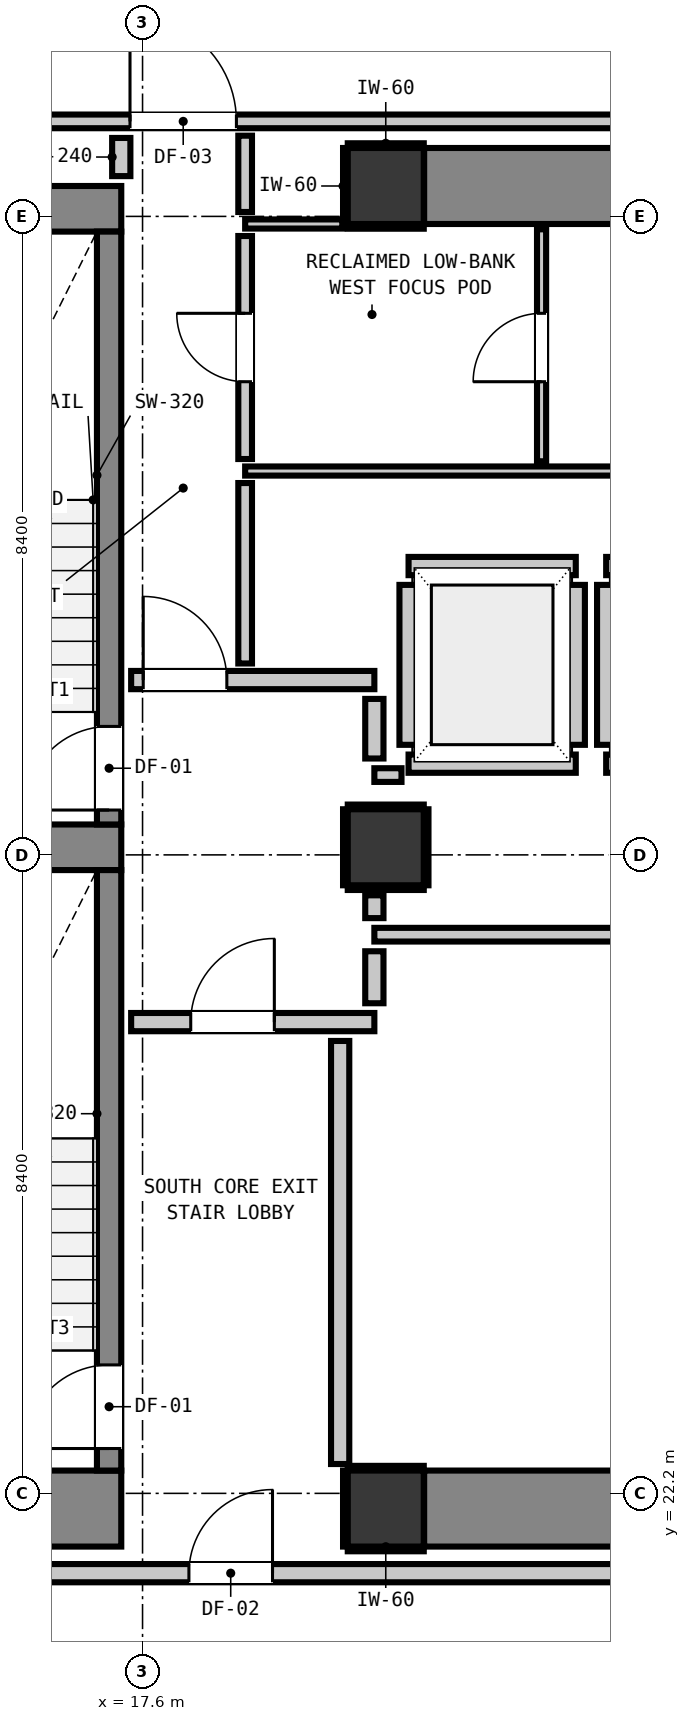
"""IFC4 building model, lengths in metres.
Left out: names, types, materials, properties, quantities, classifications, styles, units other than length and angle.
Written with IfcOpenShell. Run it as: python <this file> out.ifc"""

import sys

from ifc_helpers import new_model, si_unit, direction, frame, frame_2d, origin, origin_2d, place, context, subcontext, project, spatial, rectangle, extrude, element, fill, save


model = new_model("IFC4")
c1 = context("Model", 3, precision=1e-05, world=origin(), true_north=direction((0.0, 1.0)))
c2 = subcontext(c1, "Body", "Model", "MODEL_VIEW")
j1 = project(units=[si_unit("LENGTHUNIT", "METRE"), si_unit("PLANEANGLEUNIT", "RADIAN")], contexts=[c1])
p1 = place(None, origin())
s1 = spatial("IfcSite", under=j1, at=p1, CompositionType="ELEMENT")
p2 = place(p1, origin())
s2 = spatial("IfcBuilding", under=s1, at=p2, CompositionType="ELEMENT")
p3 = place(p2, frame((0.0, 0.0, 116.04)))
s3 = spatial("IfcBuildingStorey", under=s2, at=p3, CompositionType="ELEMENT", Elevation=116.04)
for number, where, z_axis, x_axis in (
    (1, (20.8, 22.0, 0.0), (0.0, 0.0, 1.0), (1.0, 0.0, 0.0)),
    (2, (20.8, 39.4, 0.0), (0.0, 0.0, 1.0), (1.0, 0.0, 0.0)),
):
    element("IfcColumn", number, at=place(p3, frame(where, z_axis=z_axis, x_axis=x_axis)), inside=s3, PredefinedType="COLUMN", context=c2, shape_type="SweptSolid", body=[
        extrude(rectangle(XDim=1.0, YDim=1.0, at=origin_2d()), origin(), (0.0, 0.0, 1.0), 3.32),
    ])
p4 = place(p3, frame((13.24, 22.0, 0.0), z_axis=(0.0, 0.0, 1.0), x_axis=(1.0, 0.0, 0.0)))
e3 = element("IfcWall", 3, at=p4, inside=s3, PredefinedType="SHEAR", context=c2, shape_type="SweptSolid", body=[
    extrude(rectangle(XDim=4.08, YDim=1.0, at=frame_2d((2.04, 0.0))), origin(), (0.0, 0.0, 1.0), 3.32),
])
p5 = place(p3, frame((13.24, 39.1, 0.0), z_axis=(0.0, 0.0, 1.0), x_axis=(1.0, 0.0, 0.0)))
e4 = element("IfcWall", 4, at=p5, inside=s3, PredefinedType="SHEAR", context=c2, shape_type="SweptSolid", body=[
    extrude(rectangle(XDim=4.08, YDim=0.6, at=frame_2d((2.04, 0.0))), origin(), (0.0, 0.0, 1.0), 3.32),
])
p6 = place(p3, frame((13.905, 30.7, 0.0), z_axis=(0.0, 0.0, 1.0), x_axis=(1.0, 0.0, 0.0)))
e5 = element("IfcWall", 5, at=p6, inside=s3, PredefinedType="SHEAR", context=c2, shape_type="SweptSolid", body=[
    extrude(rectangle(XDim=3.415, YDim=0.6, at=frame_2d((1.708, 0.0))), origin(), (0.0, 0.0, 1.0), 3.32),
])
for number, where, z_axis, x_axis in (
    (6, (21.305, 22.0, 0.0), (0.0, 0.0, 1.0), (1.0, 0.0, 0.0)),
    (7, (21.305, 39.4, 0.0), (0.0, 0.0, 1.0), (1.0, 0.0, 0.0)),
):
    element("IfcWall", number, at=place(p3, frame(where, z_axis=z_axis, x_axis=x_axis)), inside=s3, PredefinedType="SHEAR", context=c2, shape_type="SweptSolid", body=[
        extrude(rectangle(XDim=7.39, YDim=1.0, at=frame_2d((3.695, 0.0))), origin(), (0.0, 0.0, 1.0), 3.32),
    ])
p7 = place(p3, frame((17.16, 31.0, 0.0), z_axis=(0.0, 0.0, 1.0), x_axis=(0.0, 1.0, 0.0)))
e8 = element("IfcWall", 8, at=p7, inside=s3, PredefinedType="SHEAR", context=c2, shape_type="SweptSolid", body=[
    extrude(rectangle(XDim=7.8, YDim=0.32, at=frame_2d((3.9, 0.0))), origin(), (0.0, 0.0, 1.0), 3.32),
])
p8 = place(p7, frame((0.19, 0.0, 0.0)))
e9 = element("IfcOpeningElement", 9, at=p8, cuts=e8, PredefinedType="OPENING", context=c2, shape_type="SweptSolid", body=[
    extrude(rectangle(XDim=1.1, YDim=2.15, at=frame_2d((0.55, 1.075))), frame((0.0, 0.17, 0.0), z_axis=(0.0, -1.0, 0.0), x_axis=(1.0, 0.0, 0.0)), (0.0, 0.0, 1.0), 0.34),
])
p9 = place(p3, frame((17.16, 22.5, 0.0), z_axis=(0.0, 0.0, 1.0), x_axis=(0.0, 1.0, 0.0)))
e10 = element("IfcWall", 10, at=p9, inside=s3, PredefinedType="SHEAR", context=c2, shape_type="SweptSolid", body=[
    extrude(rectangle(XDim=7.9, YDim=0.32, at=frame_2d((3.95, 0.0))), origin(), (0.0, 0.0, 1.0), 3.32),
])
p10 = place(p9, frame((0.29, 0.0, 0.0)))
e11 = element("IfcOpeningElement", 11, at=p10, cuts=e10, PredefinedType="OPENING", context=c2, shape_type="SweptSolid", body=[
    extrude(rectangle(XDim=1.1, YDim=2.15, at=frame_2d((0.55, 1.075))), frame((0.0, 0.17, 0.0), z_axis=(0.0, -1.0, 0.0), x_axis=(1.0, 0.0, 0.0)), (0.0, 0.0, 1.0), 0.34),
])
p11 = place(p3, frame((20.8, 30.7, 0.0), z_axis=(0.0, 0.0, 1.0), x_axis=(1.0, 0.0, 0.0)))
e12 = element("IfcColumn", 12, at=p11, inside=s3, PredefinedType="COLUMN", context=c2, shape_type="SweptSolid", body=[
    extrude(rectangle(XDim=1.0, YDim=1.0, at=origin_2d()), origin(), (0.0, 0.0, 1.0), 3.32),
])
for number, where, z_axis, x_axis in (
    (13, (21.1, 31.8, 0.0), (0.0, 0.0, 1.0), (1.0, 0.0, 0.0)),
    (14, (21.1, 34.4, 0.0), (0.0, 0.0, 1.0), (1.0, 0.0, 0.0)),
):
    element("IfcWall", number, at=place(p3, frame(where, z_axis=z_axis, x_axis=x_axis)), inside=s3, PredefinedType="PARTITIONING", context=c2, shape_type="SweptSolid", body=[
        extrude(rectangle(XDim=2.2, YDim=0.24, at=frame_2d((1.1, 0.0))), origin(), (0.0, 0.0, 1.0), 3.08),
    ])
p12 = place(p3, frame((21.1, 32.048, 0.0), z_axis=(0.0, 0.0, 1.0), x_axis=(0.0, 1.0, 0.0)))
e15 = element("IfcWall", 15, at=p12, inside=s3, PredefinedType="PARTITIONING", context=c2, shape_type="SweptSolid", body=[
    extrude(rectangle(XDim=2.104, YDim=0.24, at=frame_2d((1.052, 0.0))), origin(), (0.0, 0.0, 1.0), 2.315),
])
p13 = place(p3, frame((23.3, 32.048, 0.0), z_axis=(0.0, 0.0, 1.0), x_axis=(0.0, 1.0, 0.0)))
e16 = element("IfcWall", 16, at=p13, inside=s3, PredefinedType="PARTITIONING", context=c2, shape_type="SweptSolid", body=[
    extrude(rectangle(XDim=2.104, YDim=0.24, at=frame_2d((1.052, 0.0))), origin(), (0.0, 0.0, 1.0), 3.08),
])
for number, where, z_axis, x_axis in (
    (17, (23.7, 31.8, 0.0), (0.0, 0.0, 1.0), (1.0, 0.0, 0.0)),
    (18, (23.7, 34.4, 0.0), (0.0, 0.0, 1.0), (1.0, 0.0, 0.0)),
):
    element("IfcWall", number, at=place(p3, frame(where, z_axis=z_axis, x_axis=x_axis)), inside=s3, PredefinedType="PARTITIONING", context=c2, shape_type="SweptSolid", body=[
        extrude(rectangle(XDim=2.2, YDim=0.24, at=frame_2d((1.1, 0.0))), origin(), (0.0, 0.0, 1.0), 3.08),
    ])
p14 = place(p3, frame((23.7, 32.048, 0.0), z_axis=(0.0, 0.0, 1.0), x_axis=(0.0, 1.0, 0.0)))
e19 = element("IfcWall", 19, at=p14, inside=s3, PredefinedType="PARTITIONING", context=c2, shape_type="SweptSolid", body=[
    extrude(rectangle(XDim=2.104, YDim=0.24, at=frame_2d((1.052, 0.0))), origin(), (0.0, 0.0, 1.0), 3.08),
])
p15 = place(p3, frame((3.207, 21.15, 0.0), z_axis=(0.0, 0.0, 1.0), x_axis=(1.0, 0.0, 0.0)))
e20 = element("IfcWall", 20, at=p15, inside=s3, PredefinedType="PARTITIONING", context=c2, shape_type="SweptSolid", body=[
    extrude(rectangle(XDim=39.386, YDim=0.24, at=frame_2d((19.693, 0.0))), origin(), (0.0, 0.0, 1.0), 3.08),
])
p16 = place(p15, frame((15.003, 0.0, 0.0)))
e21 = element("IfcOpeningElement", 21, at=p16, cuts=e20, PredefinedType="OPENING", context=c2, shape_type="SweptSolid", body=[
    extrude(rectangle(XDim=1.1, YDim=2.15, at=frame_2d((0.55, 1.075))), frame((0.0, 0.13, 0.0), z_axis=(0.0, -1.0, 0.0), x_axis=(1.0, 0.0, 0.0)), (0.0, 0.0, 1.0), 0.26),
])
p17 = place(p15, frame((7.243, 0.0, 0.0)))
e22 = element("IfcOpeningElement", 22, at=p17, cuts=e20, PredefinedType="OPENING", context=c2, shape_type="SweptSolid", body=[
    extrude(rectangle(XDim=1.4, YDim=2.15, at=frame_2d((0.7, 1.075))), frame((0.0, 0.13, 0.0), z_axis=(0.0, -1.0, 0.0), x_axis=(1.0, 0.0, 0.0)), (0.0, 0.0, 1.0), 0.26),
])
p18 = place(p15, frame((34.843, 0.0, 0.0)))
e23 = element("IfcOpeningElement", 23, at=p18, cuts=e20, PredefinedType="OPENING", context=c2, shape_type="SweptSolid", body=[
    extrude(rectangle(XDim=1.4, YDim=2.15, at=frame_2d((0.7, 1.075))), frame((0.0, 0.13, 0.0), z_axis=(0.0, -1.0, 0.0), x_axis=(1.0, 0.0, 0.0)), (0.0, 0.0, 1.0), 0.26),
])
p19 = place(p3, frame((17.45, 28.4, 0.0), z_axis=(0.0, 0.0, 1.0), x_axis=(1.0, 0.0, 0.0)))
e24 = element("IfcWall", 24, at=p19, inside=s3, PredefinedType="PARTITIONING", context=c2, shape_type="SweptSolid", body=[
    extrude(rectangle(XDim=3.2, YDim=0.24, at=frame_2d((1.6, 0.0))), origin(), (0.0, 0.0, 1.0), 3.08),
])
p20 = place(p19, frame((0.784, 0.0, 0.0)))
e25 = element("IfcOpeningElement", 25, at=p20, cuts=e24, PredefinedType="OPENING", context=c2, shape_type="SweptSolid", body=[
    extrude(rectangle(XDim=1.1, YDim=2.15, at=frame_2d((0.55, 1.075))), frame((0.0, 0.13, 0.0), z_axis=(0.0, -1.0, 0.0), x_axis=(1.0, 0.0, 0.0)), (0.0, 0.0, 1.0), 0.26),
])
p21 = place(p3, frame((17.45, 32.9, 0.0), z_axis=(0.0, 0.0, 1.0), x_axis=(1.0, 0.0, 0.0)))
e26 = element("IfcWall", 26, at=p21, inside=s3, PredefinedType="PARTITIONING", context=c2, shape_type="SweptSolid", body=[
    extrude(rectangle(XDim=3.2, YDim=0.24, at=frame_2d((1.6, 0.0))), origin(), (0.0, 0.0, 1.0), 3.08),
])
p22 = place(p21, frame((0.159, 0.0, 0.0)))
e27 = element("IfcOpeningElement", 27, at=p22, cuts=e26, PredefinedType="OPENING", context=c2, shape_type="SweptSolid", body=[
    extrude(rectangle(XDim=1.1, YDim=2.15, at=frame_2d((0.55, 1.075))), frame((0.0, 0.13, 0.0), z_axis=(0.0, -1.0, 0.0), x_axis=(1.0, 0.0, 0.0)), (0.0, 0.0, 1.0), 0.26),
])
p23 = place(p3, frame((20.65, 29.55, 0.0), z_axis=(0.0, 0.0, 1.0), x_axis=(1.0, 0.0, 0.0)))
e28 = element("IfcWall", 28, at=p23, inside=s3, PredefinedType="PARTITIONING", context=c2, shape_type="SweptSolid", body=[
    extrude(rectangle(XDim=9.325, YDim=0.18, at=frame_2d((4.663, 0.0))), origin(), (0.0, 0.0, 1.0), 3.08),
])
p24 = place(p3, frame((20.65, 31.65, 0.0), z_axis=(0.0, 0.0, 1.0), x_axis=(1.0, 0.0, 0.0)))
e29 = element("IfcWall", 29, at=p24, inside=s3, PredefinedType="PARTITIONING", context=c2, shape_type="SweptSolid", body=[
    extrude(rectangle(XDim=0.357, YDim=0.18, at=frame_2d((0.179, 0.0))), origin(), (0.0, 0.0, 1.0), 3.08),
])
p25 = place(p3, frame((12.979, 40.25, 0.0), z_axis=(0.0, 0.0, 1.0), x_axis=(1.0, 0.0, 0.0)))
e30 = element("IfcWall", 30, at=p25, inside=s3, PredefinedType="PARTITIONING", context=c2, shape_type="SweptSolid", body=[
    extrude(rectangle(XDim=29.614, YDim=0.18, at=frame_2d((14.807, 0.0))), origin(), (0.0, 0.0, 1.0), 3.08),
])
p26 = place(p25, frame((4.456, 0.0, 0.0)))
e31 = element("IfcOpeningElement", 31, at=p26, cuts=e30, PredefinedType="OPENING", context=c2, shape_type="SweptSolid", body=[
    extrude(rectangle(XDim=1.4, YDim=2.15, at=frame_2d((0.7, 1.075))), frame((0.0, 0.1, 0.0), z_axis=(0.0, -1.0, 0.0), x_axis=(1.0, 0.0, 0.0)), (0.0, 0.0, 1.0), 0.2),
])
p27 = place(p25, frame((25.071, 0.0, 0.0)))
e32 = element("IfcOpeningElement", 32, at=p27, cuts=e30, PredefinedType="OPENING", context=c2, shape_type="SweptSolid", body=[
    extrude(rectangle(XDim=1.4, YDim=2.15, at=frame_2d((0.7, 1.075))), frame((0.0, 0.1, 0.0), z_axis=(0.0, -1.0, 0.0), x_axis=(1.0, 0.0, 0.0)), (0.0, 0.0, 1.0), 0.2),
])
p28 = place(p3, frame((18.95, 35.65, 0.0), z_axis=(0.0, 0.0, 1.0), x_axis=(1.0, 0.0, 0.0)))
e33 = element("IfcWall", 33, at=p28, inside=s3, PredefinedType="PARTITIONING", context=c2, shape_type="SweptSolid", body=[
    extrude(rectangle(XDim=11.025, YDim=0.12, at=frame_2d((5.513, 0.0))), origin(), (0.0, 0.0, 1.0), 3.08),
])
p29 = place(p3, frame((18.95, 38.9, 0.0), z_axis=(0.0, 0.0, 1.0), x_axis=(1.0, 0.0, 0.0)))
e34 = element("IfcWall", 34, at=p29, inside=s3, PredefinedType="PARTITIONING", context=c2, shape_type="SweptSolid", body=[
    extrude(rectangle(XDim=1.278, YDim=0.12, at=frame_2d((0.639, 0.0))), origin(), (0.0, 0.0, 1.0), 3.08),
])
p30 = place(p3, frame((17.32, 39.53, 0.0), z_axis=(0.0, 0.0, 1.0), x_axis=(0.0, 1.0, 0.0)))
e35 = element("IfcWall", 35, at=p30, inside=s3, PredefinedType="PARTITIONING", context=c2, shape_type="SweptSolid", body=[
    extrude(rectangle(XDim=0.502, YDim=0.24, at=frame_2d((0.251, 0.0))), origin(), (0.0, 0.0, 1.0), 3.08),
])
p31 = place(p3, frame((20.2, 22.586, 0.0), z_axis=(0.0, 0.0, 1.0), x_axis=(0.0, 1.0, 0.0)))
e36 = element("IfcWall", 36, at=p31, inside=s3, PredefinedType="PARTITIONING", context=c2, shape_type="SweptSolid", body=[
    extrude(rectangle(XDim=5.566, YDim=0.24, at=frame_2d((2.783, 0.0))), origin(), (0.0, 0.0, 1.0), 3.08),
])
p32 = place(p3, frame((20.65, 28.648, 0.0), z_axis=(0.0, 0.0, 1.0), x_axis=(0.0, 1.0, 0.0)))
e37 = element("IfcWall", 37, at=p32, inside=s3, PredefinedType="PARTITIONING", context=c2, shape_type="SweptSolid", body=[
    extrude(rectangle(XDim=0.684, YDim=0.24, at=frame_2d((0.342, 0.0))), origin(), (0.0, 0.0, 1.0), 2.315),
])
p33 = place(p3, frame((20.65, 29.768, 0.0), z_axis=(0.0, 0.0, 1.0), x_axis=(0.0, 1.0, 0.0)))
e38 = element("IfcWall", 38, at=p33, inside=s3, PredefinedType="PARTITIONING", context=c2, shape_type="SweptSolid", body=[
    extrude(rectangle(XDim=0.3, YDim=0.24, at=frame_2d((0.15, 0.0))), origin(), (0.0, 0.0, 1.0), 2.315),
])
p34 = place(p3, frame((20.65, 31.868, 0.0), z_axis=(0.0, 0.0, 1.0), x_axis=(0.0, 1.0, 0.0)))
e39 = element("IfcWall", 39, at=p34, inside=s3, PredefinedType="PARTITIONING", context=c2, shape_type="SweptSolid", body=[
    extrude(rectangle(XDim=0.784, YDim=0.24, at=frame_2d((0.392, 0.0))), origin(), (0.0, 0.0, 1.0), 2.315),
])
p35 = place(p3, frame((18.95, 33.118, 0.0), z_axis=(0.0, 0.0, 1.0), x_axis=(0.0, 1.0, 0.0)))
e40 = element("IfcWall", 40, at=p35, inside=s3, PredefinedType="PARTITIONING", context=c2, shape_type="SweptSolid", body=[
    extrude(rectangle(XDim=2.374, YDim=0.18, at=frame_2d((1.187, 0.0))), origin(), (0.0, 0.0, 1.0), 3.08),
])
p36 = place(p3, frame((18.95, 35.808, 0.0), z_axis=(0.0, 0.0, 1.0), x_axis=(0.0, 1.0, 0.0)))
e41 = element("IfcWall", 41, at=p36, inside=s3, PredefinedType="PARTITIONING", context=c2, shape_type="SweptSolid", body=[
    extrude(rectangle(XDim=2.934, YDim=0.18, at=frame_2d((1.467, 0.0))), origin(), (0.0, 0.0, 1.0), 3.08),
])
p37 = place(p36, frame((1.017, 0.0, 0.0)))
e42 = element("IfcOpeningElement", 42, at=p37, cuts=e41, PredefinedType="OPENING", context=c2, shape_type="SweptSolid", body=[
    extrude(rectangle(XDim=0.9, YDim=2.1, at=frame_2d((0.45, 1.05))), frame((0.0, 0.1, 0.0), z_axis=(0.0, -1.0, 0.0), x_axis=(1.0, 0.0, 0.0)), (0.0, 0.0, 1.0), 0.2),
])
p38 = place(p3, frame((18.95, 39.058, 0.0), z_axis=(0.0, 0.0, 1.0), x_axis=(0.0, 1.0, 0.0)))
e43 = element("IfcWall", 43, at=p38, inside=s3, PredefinedType="PARTITIONING", context=c2, shape_type="SweptSolid", body=[
    extrude(rectangle(XDim=1.004, YDim=0.18, at=frame_2d((0.502, 0.0))), origin(), (0.0, 0.0, 1.0), 3.08),
])
p39 = place(p3, frame((22.85, 35.778, 0.0), z_axis=(0.0, 0.0, 1.0), x_axis=(0.0, 1.0, 0.0)))
e44 = element("IfcWall", 44, at=p39, inside=s3, PredefinedType="PARTITIONING", context=c2, shape_type="SweptSolid", body=[
    extrude(rectangle(XDim=3.052, YDim=0.12, at=frame_2d((1.526, 0.0))), origin(), (0.0, 0.0, 1.0), 3.08),
])
p40 = place(p39, frame((1.047, 0.0, 0.0)))
e45 = element("IfcOpeningElement", 45, at=p40, cuts=e44, PredefinedType="OPENING", context=c2, shape_type="SweptSolid", body=[
    extrude(rectangle(XDim=0.9, YDim=2.1, at=frame_2d((0.45, 1.05))), frame((0.0, 0.07, 0.0), z_axis=(0.0, -1.0, 0.0), x_axis=(1.0, 0.0, 0.0)), (0.0, 0.0, 1.0), 0.14),
])
for number, where, z_axis, x_axis in (
    (46, (20.3, 21.468, 0.0), (0.0, 0.0, 1.0), (1.0, 0.0, 0.0)),
    (47, (20.3, 22.532, 0.0), (0.0, 0.0, 1.0), (1.0, 0.0, 0.0)),
    (48, (20.268, 21.5, 0.0), (0.0, 0.0, 1.0), (0.0, 1.0, 0.0)),
    (49, (20.3, 38.868, 0.0), (0.0, 0.0, 1.0), (1.0, 0.0, 0.0)),
    (50, (20.3, 39.932, 0.0), (0.0, 0.0, 1.0), (1.0, 0.0, 0.0)),
    (51, (20.268, 38.9, 0.0), (0.0, 0.0, 1.0), (0.0, 1.0, 0.0)),
    (52, (20.3, 30.168, 0.0), (0.0, 0.0, 1.0), (1.0, 0.0, 0.0)),
    (53, (20.3, 31.232, 0.0), (0.0, 0.0, 1.0), (1.0, 0.0, 0.0)),
    (54, (20.268, 30.2, 0.0), (0.0, 0.0, 1.0), (0.0, 1.0, 0.0)),
    (55, (21.332, 30.2, 0.0), (0.0, 0.0, 1.0), (0.0, 1.0, 0.0)),
):
    element("IfcWall", number, at=place(p3, frame(where, z_axis=z_axis, x_axis=x_axis)), inside=s3, PredefinedType="PARTITIONING", context=c2, shape_type="SweptSolid", body=[
        extrude(rectangle(XDim=1.0, YDim=0.06, at=frame_2d((0.5, 0.0))), origin(), (0.0, 0.0, 1.0), 1.45),
    ])
p41 = place(p8, origin())
e56 = element("IfcDoor", 56, at=p41, inside=s3, OperationType="SINGLE_SWING_LEFT", PredefinedType="DOOR", context=c2, shape_type="SweptSolid", body=[
    extrude(rectangle(XDim=1.1, YDim=2.15, at=frame_2d((0.55, 1.075))), frame((0.0, 0.025, 0.0), z_axis=(0.0, -1.0, 0.0), x_axis=(1.0, 0.0, 0.0)), (0.0, 0.0, 1.0), 0.05),
])
fill(e9, e56)
p42 = place(p10, origin())
e57 = element("IfcDoor", 57, at=p42, inside=s3, OperationType="SINGLE_SWING_LEFT", PredefinedType="DOOR", context=c2, shape_type="SweptSolid", body=[
    extrude(rectangle(XDim=1.1, YDim=2.15, at=frame_2d((0.55, 1.075))), frame((0.0, 0.025, 0.0), z_axis=(0.0, -1.0, 0.0), x_axis=(1.0, 0.0, 0.0)), (0.0, 0.0, 1.0), 0.05),
])
fill(e11, e57)
p43 = place(p20, origin())
e58 = element("IfcDoor", 58, at=p43, inside=s3, OperationType="SINGLE_SWING_RIGHT", PredefinedType="DOOR", context=c2, shape_type="SweptSolid", body=[
    extrude(rectangle(XDim=1.1, YDim=2.15, at=frame_2d((0.55, 1.075))), frame((0.0, 0.025, 0.0), z_axis=(0.0, -1.0, 0.0), x_axis=(1.0, 0.0, 0.0)), (0.0, 0.0, 1.0), 0.05),
])
fill(e25, e58)
p44 = place(p22, origin())
e59 = element("IfcDoor", 59, at=p44, inside=s3, OperationType="SINGLE_SWING_LEFT", PredefinedType="DOOR", context=c2, shape_type="SweptSolid", body=[
    extrude(rectangle(XDim=1.1, YDim=2.15, at=frame_2d((0.55, 1.075))), frame((0.0, 0.025, 0.0), z_axis=(0.0, -1.0, 0.0), x_axis=(1.0, 0.0, 0.0)), (0.0, 0.0, 1.0), 0.05),
])
fill(e27, e59)
p45 = place(p16, origin())
e60 = element("IfcDoor", 60, at=p45, inside=s3, OperationType="SINGLE_SWING_RIGHT", PredefinedType="DOOR", context=c2, shape_type="SweptSolid", body=[
    extrude(rectangle(XDim=1.1, YDim=2.15, at=frame_2d((0.55, 1.075))), frame((0.0, 0.025, 0.0), z_axis=(0.0, -1.0, 0.0), x_axis=(1.0, 0.0, 0.0)), (0.0, 0.0, 1.0), 0.05),
])
fill(e21, e60)
p46 = place(p26, origin())
e61 = element("IfcDoor", 61, at=p46, inside=s3, OperationType="SINGLE_SWING_LEFT", PredefinedType="DOOR", context=c2, shape_type="SweptSolid", body=[
    extrude(rectangle(XDim=1.4, YDim=2.15, at=frame_2d((0.7, 1.075))), frame((0.0, 0.025, 0.0), z_axis=(0.0, -1.0, 0.0), x_axis=(1.0, 0.0, 0.0)), (0.0, 0.0, 1.0), 0.05),
])
fill(e31, e61)
p47 = place(p37, origin())
e62 = element("IfcDoor", 62, at=p47, inside=s3, OperationType="SINGLE_SWING_RIGHT", PredefinedType="DOOR", context=c2, shape_type="SweptSolid", body=[
    extrude(rectangle(XDim=0.9, YDim=2.1, at=frame_2d((0.45, 1.05))), frame((0.0, 0.025, 0.0), z_axis=(0.0, -1.0, 0.0), x_axis=(1.0, 0.0, 0.0)), (0.0, 0.0, 1.0), 0.05),
])
fill(e42, e62)
p48 = place(p40, origin())
e63 = element("IfcDoor", 63, at=p48, inside=s3, OperationType="SINGLE_SWING_LEFT", PredefinedType="DOOR", context=c2, shape_type="SweptSolid", body=[
    extrude(rectangle(XDim=0.9, YDim=2.1, at=frame_2d((0.45, 1.05))), frame((0.0, 0.025, 0.0), z_axis=(0.0, -1.0, 0.0), x_axis=(1.0, 0.0, 0.0)), (0.0, 0.0, 1.0), 0.05),
])
fill(e45, e63)
save(model, sys.argv[1])
